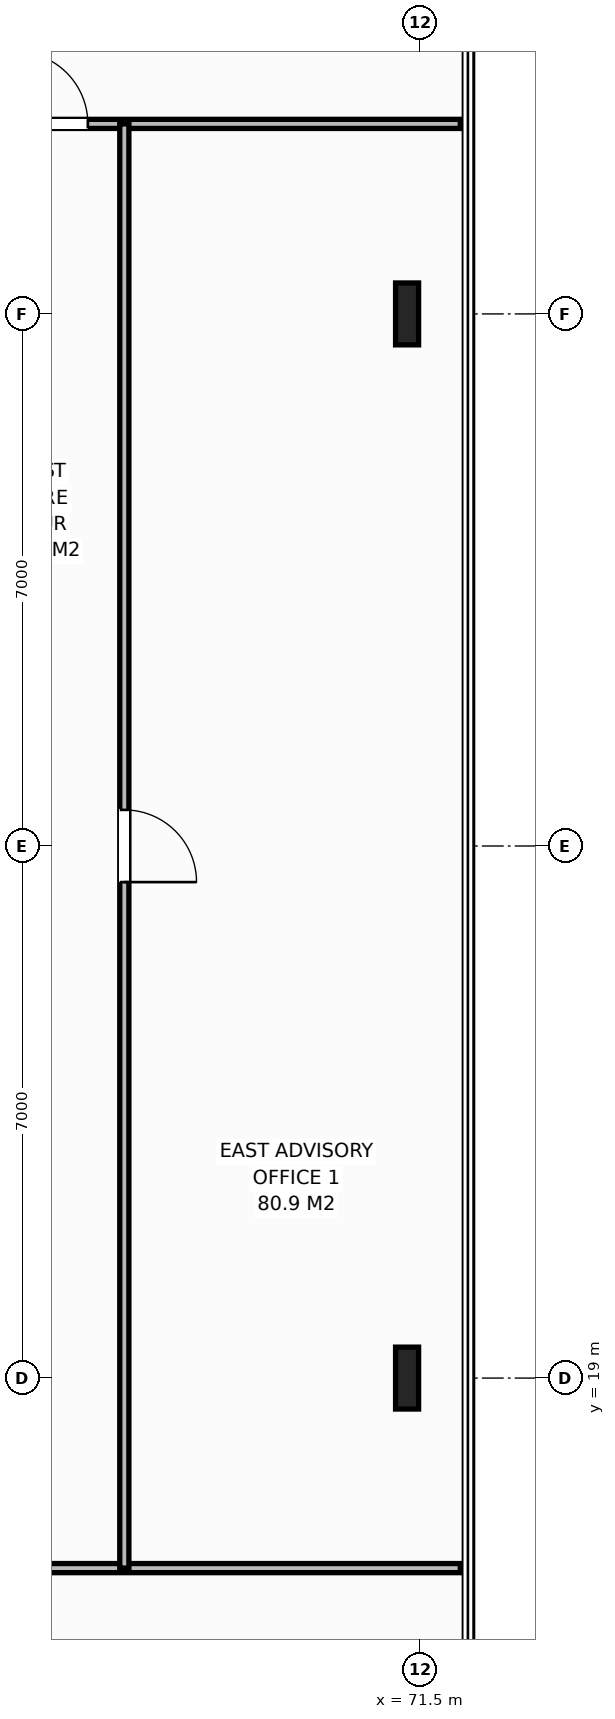
"""IFC4 building model, lengths in metres.
Left out: names, types, materials, properties, quantities, classifications, styles, units other than length and angle.
Written with IfcOpenShell. Run it as: python <this file> out.ifc"""

import sys

from ifc_helpers import new_model, si_unit, direction, frame, frame_2d, origin, origin_2d, place, context, subcontext, project, spatial, rectangle, i_section, extrude, element, fill, save


model = new_model("IFC4")
c1 = context("Model", 3, precision=1e-05, world=origin(), true_north=direction((0.0, 1.0)))
c2 = subcontext(c1, "Body", "Model", "MODEL_VIEW")
j1 = project(units=[si_unit("LENGTHUNIT", "METRE"), si_unit("PLANEANGLEUNIT", "RADIAN")], contexts=[c1])
p1 = place(None, origin())
s1 = spatial("IfcSite", under=j1, at=p1, CompositionType="ELEMENT")
p2 = place(p1, origin())
s2 = spatial("IfcBuilding", under=s1, at=p2, CompositionType="ELEMENT")
p3 = place(p2, frame((0.0, 0.0, 232.8)))
s3 = spatial("IfcBuildingStorey", under=s2, at=p3, CompositionType="ELEMENT", Elevation=232.8)
for number, where, z_axis, x_axis in (
    (1, (71.32, 19.0, 0.0), (0.0, 0.0, 1.0), (1.0, 0.0, 0.0)),
    (2, (71.32, 33.0, 0.0), (0.0, 0.0, 1.0), (1.0, 0.0, 0.0)),
):
    element("IfcColumn", number, at=place(p3, frame(where, z_axis=z_axis, x_axis=x_axis)), inside=s3, PredefinedType="COLUMN", context=c2, shape_type="SweptSolid", body=[
        extrude(i_section(OverallWidth=0.303, OverallDepth=0.814, WebThickness=0.021, FlangeThickness=0.04, at=origin_2d()), origin(), (0.0, 0.0, 1.0), 3.8),
    ])
p4 = place(p3, frame((65.013, 35.5, 0.0), z_axis=(0.0, 0.0, 1.0), x_axis=(1.0, 0.0, 0.0)))
e3 = element("IfcWall", 3, at=p4, inside=s3, PredefinedType="PARTITIONING", context=c2, shape_type="SweptSolid", body=[
    extrude(rectangle(XDim=7.007, YDim=0.12, at=frame_2d((3.504, 0.0))), origin(), (0.0, 0.0, 1.0), 3.58),
])
p5 = place(p4, frame((1.157, 0.0, 0.0)))
e4 = element("IfcOpeningElement", 4, at=p5, cuts=e3, PredefinedType="OPENING", context=c2, shape_type="SweptSolid", body=[
    extrude(rectangle(XDim=0.95, YDim=2.15, at=frame_2d((0.475, 1.075))), frame((0.0, 0.07, 0.0), z_axis=(0.0, -1.0, 0.0), x_axis=(1.0, 0.0, 0.0)), (0.0, 0.0, 1.0), 0.14),
])
p6 = place(p3, frame((58.674, 16.5, 0.0), z_axis=(0.0, 0.0, 1.0), x_axis=(1.0, 0.0, 0.0)))
e5 = element("IfcWall", 5, at=p6, inside=s3, PredefinedType="PARTITIONING", context=c2, shape_type="SweptSolid", body=[
    extrude(rectangle(XDim=13.346, YDim=0.12, at=frame_2d((6.673, 0.0))), origin(), (0.0, 0.0, 1.0), 3.58),
])
p7 = place(p6, frame((3.988, 0.0, 0.0)))
e6 = element("IfcOpeningElement", 6, at=p7, cuts=e5, PredefinedType="OPENING", context=c2, shape_type="SweptSolid", body=[
    extrude(rectangle(XDim=0.95, YDim=2.15, at=frame_2d((0.475, 1.075))), frame((0.0, 0.07, 0.0), z_axis=(0.0, -1.0, 0.0), x_axis=(1.0, 0.0, 0.0)), (0.0, 0.0, 1.0), 0.14),
])
p8 = place(p3, frame((67.6, 16.5, 0.0), z_axis=(0.0, 0.0, 1.0), x_axis=(0.0, 1.0, 0.0)))
e7 = element("IfcWall", 7, at=p8, inside=s3, PredefinedType="PARTITIONING", context=c2, shape_type="SweptSolid", body=[
    extrude(rectangle(XDim=19.0, YDim=0.12, at=frame_2d((9.5, 0.0))), origin(), (0.0, 0.0, 1.0), 3.58),
])
p9 = place(p8, frame((9.025, 0.0, 0.0)))
e8 = element("IfcOpeningElement", 8, at=p9, cuts=e7, PredefinedType="OPENING", context=c2, shape_type="SweptSolid", body=[
    extrude(rectangle(XDim=0.95, YDim=2.15, at=frame_2d((0.475, 1.075))), frame((0.0, 0.07, 0.0), z_axis=(0.0, -1.0, 0.0), x_axis=(1.0, 0.0, 0.0)), (0.0, 0.0, 1.0), 0.14),
])
p10 = place(p5, origin())
e9 = element("IfcDoor", 9, at=p10, inside=s3, OperationType="SINGLE_SWING_LEFT", PredefinedType="DOOR", context=c2, shape_type="SweptSolid", body=[
    extrude(rectangle(XDim=0.95, YDim=2.15, at=frame_2d((0.475, 1.075))), frame((0.0, 0.025, 0.0), z_axis=(0.0, -1.0, 0.0), x_axis=(1.0, 0.0, 0.0)), (0.0, 0.0, 1.0), 0.05),
])
fill(e4, e9)
p11 = place(p9, origin())
e10 = element("IfcDoor", 10, at=p11, inside=s3, OperationType="SINGLE_SWING_RIGHT", PredefinedType="DOOR", context=c2, shape_type="SweptSolid", body=[
    extrude(rectangle(XDim=0.95, YDim=2.15, at=frame_2d((0.475, 1.075))), frame((0.0, 0.025, 0.0), z_axis=(0.0, -1.0, 0.0), x_axis=(1.0, 0.0, 0.0)), (0.0, 0.0, 1.0), 0.05),
])
fill(e8, e10)
save(model, sys.argv[1])
